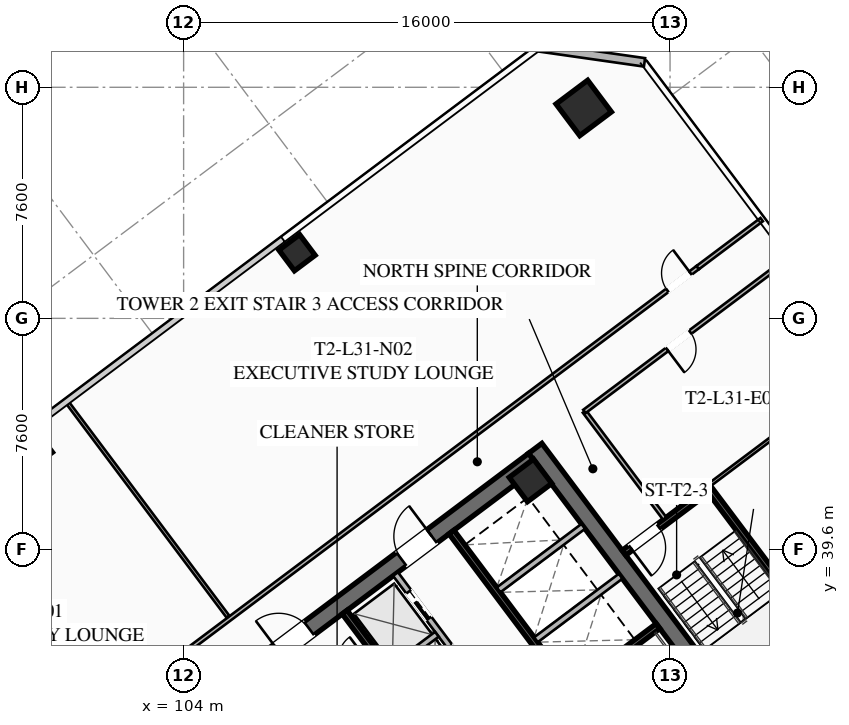
"""IFC4 building model, lengths in metres.
Left out: names, types, materials, properties, quantities, classifications, styles, units other than length and angle.
Written with IfcOpenShell. Run it as: python <this file> out.ifc"""

import sys

from ifc_helpers import new_model, si_unit, direction, frame, frame_2d, origin, origin_2d, place, context, subcontext, project, spatial, rectangle, hollow_rectangle, extrude, element, fill, save


model = new_model("IFC4")
c1 = context("Model", 3, precision=1e-05, world=origin(), true_north=direction((0.0, 1.0)))
c2 = subcontext(c1, "Body", "Model", "MODEL_VIEW")
j1 = project(units=[si_unit("LENGTHUNIT", "METRE"), si_unit("PLANEANGLEUNIT", "RADIAN")], contexts=[c1])
p1 = place(None, origin())
s1 = spatial("IfcSite", under=j1, at=p1, CompositionType="ELEMENT")
p2 = place(p1, origin())
s2 = spatial("IfcBuilding", under=s1, at=p2, CompositionType="ELEMENT")
p3 = place(p2, frame((0.0, 0.0, 117.95)))
s3 = spatial("IfcBuildingStorey", under=s2, at=p3, CompositionType="ELEMENT", Elevation=117.95)
p4 = place(p3, frame((115.564, 42.923, 0.0), z_axis=(0.0, 0.0, 1.0), x_axis=(0.600005007985, -0.799996243986, 0.0)))
e1 = element("IfcWall", 1, at=p4, inside=s3, PredefinedType="SHEAR", context=c2, shape_type="SweptSolid", body=[
    extrude(rectangle(XDim=15.6, YDim=0.55, at=frame_2d((7.8, 0.0))), origin(), (0.0, 0.0, 1.0), 3.55),
])
p5 = place(p3, frame((103.461, 33.502, 0.0), z_axis=(0.0, 0.0, 1.0), x_axis=(0.799998054672, 0.600002593761, 0.0)))
e2 = element("IfcWall", 2, at=p5, inside=s3, PredefinedType="SHEAR", context=c2, shape_type="SweptSolid", body=[
    extrude(rectangle(XDim=15.06, YDim=0.55, at=frame_2d((7.53, 0.0))), origin(), (0.0, 0.0, 1.0), 3.55),
])
p6 = place(p5, frame((4.58, 0.0, 0.0)))
e3 = element("IfcOpeningElement", 3, at=p6, cuts=e2, PredefinedType="OPENING", context=c2, shape_type="SweptSolid", body=[
    extrude(rectangle(XDim=1.25, YDim=2.25, at=frame_2d((0.625, 1.125))), frame((0.0, 0.285, 0.0), z_axis=(0.0, -1.0, 0.0), x_axis=(1.0, 0.0, 0.0)), (0.0, 0.0, 1.0), 0.57),
])
p7 = place(p5, frame((9.63, 0.0, 0.0)))
e4 = element("IfcOpeningElement", 4, at=p7, cuts=e2, PredefinedType="OPENING", context=c2, shape_type="SweptSolid", body=[
    extrude(rectangle(XDim=1.25, YDim=2.25, at=frame_2d((0.625, 1.125))), frame((0.0, 0.285, 0.0), z_axis=(0.0, -1.0, 0.0), x_axis=(1.0, 0.0, 0.0)), (0.0, 0.0, 1.0), 0.57),
])
p8 = place(p3, frame((115.41, 41.87, 0.0), z_axis=(0.0, 0.0, 1.0), x_axis=(0.799999996291, 0.600000004945, 0.0)))
e5 = element("IfcColumn", 5, at=p8, inside=s3, PredefinedType="COLUMN", context=c2, shape_type="SweptSolid", body=[
    extrude(hollow_rectangle(XDim=1.0, YDim=1.0, WallThickness=0.04, at=origin_2d()), origin(), (0.0, 0.0, 1.0), 3.37),
])
p9 = place(p3, frame((117.16, 54.12, 0.0), z_axis=(0.0, 0.0, 1.0), x_axis=(0.799999996291, 0.600000004945, 0.0)))
e6 = element("IfcColumn", 6, at=p9, inside=s3, PredefinedType="COLUMN", context=c2, shape_type="SweptSolid", body=[
    extrude(hollow_rectangle(XDim=1.3, YDim=1.3, WallThickness=0.05, at=origin_2d()), origin(), (0.0, 0.0, 1.0), 3.37),
])
for number, where, z_axis, x_axis in (
    (7, (107.73, 49.36, 0.0), (0.0, 0.0, 1.0), (0.8, 0.6, 0.0)),
    (8, (99.09, 42.88, 0.0), (0.0, 0.0, 1.0), (0.8, 0.6, 0.0)),
):
    element("IfcColumn", number, at=place(p3, frame(where, z_axis=z_axis, x_axis=x_axis)), inside=s3, PredefinedType="COLUMN", context=c2, shape_type="SweptSolid", body=[
        extrude(hollow_rectangle(XDim=0.85, YDim=0.85, WallThickness=0.035, at=origin_2d()), origin(), (0.0, 0.0, 1.0), 3.37),
    ])
p10 = place(p3, frame((115.66, 56.12, 0.0), z_axis=(0.0, 0.0, 1.0), x_axis=(0.989949493661, -0.141421356237, 0.0)))
e9 = element("IfcWall", 9, at=p10, inside=s3, PredefinedType="SOLIDWALL", context=c2, shape_type="SweptSolid", body=[
    extrude(rectangle(XDim=3.536, YDim=0.28, at=frame_2d((1.768, 0.0))), origin(), (0.0, 0.0, 1.0), 3.37),
])
p11 = place(p3, frame((116.54, 34.78, 0.0), z_axis=(0.0, 0.0, 1.0), x_axis=(0.800015298837, 0.599979601008, 0.0)))
e10 = element("IfcWall", 10, at=p11, inside=s3, PredefinedType="SHEAR", context=c2, shape_type="SweptSolid", body=[
    extrude(rectangle(XDim=3.83, YDim=0.2, at=frame_2d((1.915, 0.0))), origin(), (0.0, 0.0, 1.0), 3.37),
])
p12 = place(p3, frame((117.998, 25.936, 0.0), z_axis=(0.0, 0.0, 1.0), x_axis=(-0.600002693989, 0.799997979501, 0.0)))
e11 = element("IfcWall", 11, at=p12, inside=s3, PredefinedType="SHEAR", context=c2, shape_type="SweptSolid", body=[
    extrude(rectangle(XDim=14.5, YDim=0.2, at=frame_2d((7.25, 0.0))), origin(), (0.0, 0.0, 1.0), 3.37),
])
p13 = place(p3, frame((112.81, 40.17, 0.0), z_axis=(0.0, 0.0, 1.0), x_axis=(0.599993943644, -0.800004542231, 0.0)))
e12 = element("IfcWall", 12, at=p13, inside=s3, PredefinedType="SHEAR", context=c2, shape_type="SweptSolid", body=[
    extrude(rectangle(XDim=6.45, YDim=0.2, at=frame_2d((3.225, 0.0))), origin(), (0.0, 0.0, 1.0), 3.37),
])
for number, where, z_axis, x_axis in (
    (13, (115.59, 36.63, 0.0), (0.0, 0.0, 1.0), (0.8, 0.6, 0.0)),
    (14, (114.36, 38.27, 0.0), (0.0, 0.0, 1.0), (0.8, 0.6, 0.0)),
):
    element("IfcWall", number, at=place(p3, frame(where, z_axis=z_axis, x_axis=x_axis)), inside=s3, PredefinedType="SOLIDWALL", context=c2, shape_type="SweptSolid", body=[
        extrude(rectangle(XDim=3.48, YDim=0.2, at=frame_2d((1.74, 0.0))), origin(), (0.0, 0.0, 1.0), 3.37),
    ])
p14 = place(p3, frame((115.11, 33.27, 0.0), z_axis=(0.0, 0.0, 1.0), x_axis=(-0.600011322243, 0.799991508192, 0.0)))
e15 = element("IfcWall", 15, at=p14, inside=s3, PredefinedType="SOLIDWALL", context=c2, shape_type="SweptSolid", body=[
    extrude(rectangle(XDim=6.9, YDim=0.2, at=frame_2d((3.45, 0.0))), origin(), (0.0, 0.0, 1.0), 3.37),
])
p15 = place(p14, frame((0.575, 0.0, 0.0)))
e16 = element("IfcOpeningElement", 16, at=p15, cuts=e15, PredefinedType="OPENING", context=c2, shape_type="SweptSolid", body=[
    extrude(rectangle(XDim=1.1, YDim=2.2, at=frame_2d((0.55, 1.1))), frame((0.0, 0.11, 0.0), z_axis=(0.0, -1.0, 0.0), x_axis=(1.0, 0.0, 0.0)), (0.0, 0.0, 1.0), 0.22),
])
p16 = place(p14, frame((2.825, 0.0, 0.0)))
e17 = element("IfcOpeningElement", 17, at=p16, cuts=e15, PredefinedType="OPENING", context=c2, shape_type="SweptSolid", body=[
    extrude(rectangle(XDim=1.1, YDim=2.2, at=frame_2d((0.55, 1.1))), frame((0.0, 0.11, 0.0), z_axis=(0.0, -1.0, 0.0), x_axis=(1.0, 0.0, 0.0)), (0.0, 0.0, 1.0), 0.22),
])
p17 = place(p14, frame((5.075, 0.0, 0.0)))
e18 = element("IfcOpeningElement", 18, at=p17, cuts=e15, PredefinedType="OPENING", context=c2, shape_type="SweptSolid", body=[
    extrude(rectangle(XDim=1.1, YDim=2.2, at=frame_2d((0.55, 1.1))), frame((0.0, 0.11, 0.0), z_axis=(0.0, -1.0, 0.0), x_axis=(1.0, 0.0, 0.0)), (0.0, 0.0, 1.0), 0.22),
])
p18 = place(p3, frame((110.826, 35.682, 0.0), z_axis=(0.0, 0.0, 1.0), x_axis=(0.799984418148, 0.600020775241, 0.0)))
e19 = element("IfcWall", 19, at=p18, inside=s3, PredefinedType="SOLIDWALL", context=c2, shape_type="SweptSolid", body=[
    extrude(rectangle(XDim=1.88, YDim=0.2, at=frame_2d((0.94, 0.0))), origin(), (0.0, 0.0, 1.0), 3.37),
])
p19 = place(p3, frame((125.304, 36.228, 0.0), z_axis=(0.0, 0.0, 1.0), x_axis=(-0.59998851072, 0.800008616831, 0.0)))
e20 = element("IfcWall", 20, at=p19, inside=s3, PredefinedType="SHEAR", context=c2, shape_type="SweptSolid", body=[
    extrude(rectangle(XDim=6.8, YDim=0.2, at=frame_2d((3.4, 0.0))), origin(), (0.0, 0.0, 1.0), 3.37),
])
p20 = place(p3, frame((121.204, 41.528, 0.0), z_axis=(0.0, 0.0, 1.0), x_axis=(-0.800017232136, -0.599977023131, 0.0)))
e21 = element("IfcWall", 21, at=p20, inside=s3, PredefinedType="SHEAR", context=c2, shape_type="SweptSolid", body=[
    extrude(rectangle(XDim=3.4, YDim=0.2, at=frame_2d((1.7, 0.0))), origin(), (0.0, 0.0, 1.0), 3.37),
])
p21 = place(p20, frame((1.975, 0.0, 0.0)))
e22 = element("IfcOpeningElement", 22, at=p21, cuts=e21, PredefinedType="OPENING", context=c2, shape_type="SweptSolid", body=[
    extrude(rectangle(XDim=1.15, YDim=2.2, at=frame_2d((0.575, 1.1))), frame((0.0, 0.11, 0.0), z_axis=(0.0, -1.0, 0.0), x_axis=(1.0, 0.0, 0.0)), (0.0, 0.0, 1.0), 0.22),
])
p22 = place(p3, frame((119.824, 40.618, 0.0), z_axis=(0.0, 0.0, 1.0), x_axis=(-0.599982243973, 0.800013316712, 0.0)))
e23 = element("IfcWall", 23, at=p22, inside=s3, PredefinedType="PARTITIONING", context=c2, shape_type="SweptSolid", body=[
    extrude(rectangle(XDim=4.4, YDim=0.135, at=frame_2d((2.2, 0.0))), origin(), (0.0, 0.0, 1.0), 2.723),
])
p23 = place(p3, frame((95.87, 30.09, 0.0), z_axis=(0.0, 0.0, 1.0), x_axis=(0.799997191971, 0.600003744021, 0.0)))
e24 = element("IfcWall", 24, at=p23, inside=s3, PredefinedType="PARTITIONING", context=c2, shape_type="SweptSolid", body=[
    extrude(rectangle(XDim=31.3, YDim=0.135, at=frame_2d((15.65, 0.0))), origin(), (0.0, 0.0, 1.0), 2.723),
])
p24 = place(p23, frame((0.3, 0.0, 0.0)))
e25 = element("IfcOpeningElement", 25, at=p24, cuts=e24, PredefinedType="OPENING", context=c2, shape_type="SweptSolid", body=[
    extrude(rectangle(XDim=0.95, YDim=2.05, at=frame_2d((0.475, 1.025))), frame((0.0, 0.077, 0.0), z_axis=(0.0, -1.0, 0.0), x_axis=(1.0, 0.0, 0.0)), (0.0, 0.0, 1.0), 0.155),
])
p25 = place(p23, frame((30.05, 0.0, 0.0)))
e26 = element("IfcOpeningElement", 26, at=p25, cuts=e24, PredefinedType="OPENING", context=c2, shape_type="SweptSolid", body=[
    extrude(rectangle(XDim=0.95, YDim=2.05, at=frame_2d((0.475, 1.025))), frame((0.0, 0.077, 0.0), z_axis=(0.0, -1.0, 0.0), x_axis=(1.0, 0.0, 0.0)), (0.0, 0.0, 1.0), 0.155),
])
p26 = place(p3, frame((120.91, 48.87, 0.0), z_axis=(0.0, 0.0, 1.0), x_axis=(0.80002227902, 0.599970293491, 0.0)))
e27 = element("IfcWall", 27, at=p26, inside=s3, PredefinedType="PARTITIONING", context=c2, shape_type="SweptSolid", body=[
    extrude(rectangle(XDim=2.63, YDim=0.135, at=frame_2d((1.315, 0.0))), origin(), (0.0, 0.0, 1.0), 2.723),
])
p27 = place(p3, frame((105.462, 37.384, 0.0), z_axis=(0.0, 0.0, 1.0), x_axis=(-0.599982344389, 0.800013241404, 0.0)))
e28 = element("IfcWall", 28, at=p27, inside=s3, PredefinedType="PARTITIONING", context=c2, shape_type="SweptSolid", body=[
    extrude(rectangle(XDim=8.85, YDim=0.11, at=frame_2d((4.425, 0.0))), origin(), (0.0, 0.0, 1.0), 2.723),
])
p28 = place(p3, frame((123.944, 49.208, 0.0), z_axis=(0.0, 0.0, 1.0), x_axis=(-0.799996532921, -0.600004622744, 0.0)))
e29 = element("IfcWall", 29, at=p28, inside=s3, PredefinedType="PARTITIONING", context=c2, shape_type="SweptSolid", body=[
    extrude(rectangle(XDim=8.45, YDim=0.135, at=frame_2d((4.225, 0.0))), origin(), (0.0, 0.0, 1.0), 2.723),
])
p29 = place(p28, frame((4.1, 0.0, 0.0)))
e30 = element("IfcOpeningElement", 30, at=p29, cuts=e29, PredefinedType="OPENING", context=c2, shape_type="SweptSolid", body=[
    extrude(rectangle(XDim=0.95, YDim=2.05, at=frame_2d((0.475, 1.025))), frame((0.0, 0.077, 0.0), z_axis=(0.0, -1.0, 0.0), x_axis=(1.0, 0.0, 0.0)), (0.0, 0.0, 1.0), 0.155),
])
p30 = place(p3, frame((126.584, 45.688, 0.0), z_axis=(0.0, 0.0, 1.0), x_axis=(-0.800004438899, -0.599994081423, 0.0)))
e31 = element("IfcWall", 31, at=p30, inside=s3, PredefinedType="PARTITIONING", context=c2, shape_type="SweptSolid", body=[
    extrude(rectangle(XDim=6.6, YDim=0.11, at=frame_2d((3.3, 0.0))), origin(), (0.0, 0.0, 1.0), 2.723),
])
p31 = place(p6, origin())
e32 = element("IfcDoor", 32, at=p31, inside=s3, OperationType="SINGLE_SWING_LEFT", PredefinedType="DOOR", context=c2, shape_type="SweptSolid", body=[
    extrude(rectangle(XDim=1.25, YDim=2.25, at=frame_2d((0.625, 1.125))), frame((0.0, 0.025, 0.0), z_axis=(0.0, -1.0, 0.0), x_axis=(1.0, 0.0, 0.0)), (0.0, 0.0, 1.0), 0.05),
])
fill(e3, e32)
p32 = place(p7, origin())
e33 = element("IfcDoor", 33, at=p32, inside=s3, OperationType="SINGLE_SWING_RIGHT", PredefinedType="DOOR", context=c2, shape_type="SweptSolid", body=[
    extrude(rectangle(XDim=1.25, YDim=2.25, at=frame_2d((0.625, 1.125))), frame((0.0, 0.025, 0.0), z_axis=(0.0, -1.0, 0.0), x_axis=(1.0, 0.0, 0.0)), (0.0, 0.0, 1.0), 0.05),
])
fill(e4, e33)
p33 = place(p21, origin())
e34 = element("IfcDoor", 34, at=p33, inside=s3, OperationType="SINGLE_SWING_RIGHT", PredefinedType="DOOR", context=c2, shape_type="SweptSolid", body=[
    extrude(rectangle(XDim=1.15, YDim=2.2, at=frame_2d((0.575, 1.1))), frame((0.0, 0.025, 0.0), z_axis=(0.0, -1.0, 0.0), x_axis=(1.0, 0.0, 0.0)), (0.0, 0.0, 1.0), 0.05),
])
fill(e22, e34)
p34 = place(p25, origin())
e35 = element("IfcDoor", 35, at=p34, inside=s3, OperationType="SINGLE_SWING_RIGHT", PredefinedType="DOOR", context=c2, shape_type="SweptSolid", body=[
    extrude(rectangle(XDim=0.95, YDim=2.05, at=frame_2d((0.475, 1.025))), frame((0.0, 0.025, 0.0), z_axis=(0.0, -1.0, 0.0), x_axis=(1.0, 0.0, 0.0)), (0.0, 0.0, 1.0), 0.05),
])
fill(e26, e35)
p35 = place(p29, origin())
e36 = element("IfcDoor", 36, at=p35, inside=s3, OperationType="SINGLE_SWING_RIGHT", PredefinedType="DOOR", context=c2, shape_type="SweptSolid", body=[
    extrude(rectangle(XDim=0.95, YDim=2.05, at=frame_2d((0.475, 1.025))), frame((0.0, 0.025, 0.0), z_axis=(0.0, -1.0, 0.0), x_axis=(1.0, 0.0, 0.0)), (0.0, 0.0, 1.0), 0.05),
])
fill(e30, e36)
p36 = place(p17, origin())
e37 = element("IfcDoor", 37, at=p36, inside=s3, OperationType="SLIDING_TO_LEFT", PredefinedType="DOOR", context=c2, shape_type="SweptSolid", body=[
    extrude(rectangle(XDim=1.1, YDim=2.2, at=frame_2d((0.55, 1.1))), frame((0.0, 0.025, 0.0), z_axis=(0.0, -1.0, 0.0), x_axis=(1.0, 0.0, 0.0)), (0.0, 0.0, 1.0), 0.05),
])
fill(e18, e37)
save(model, sys.argv[1])
